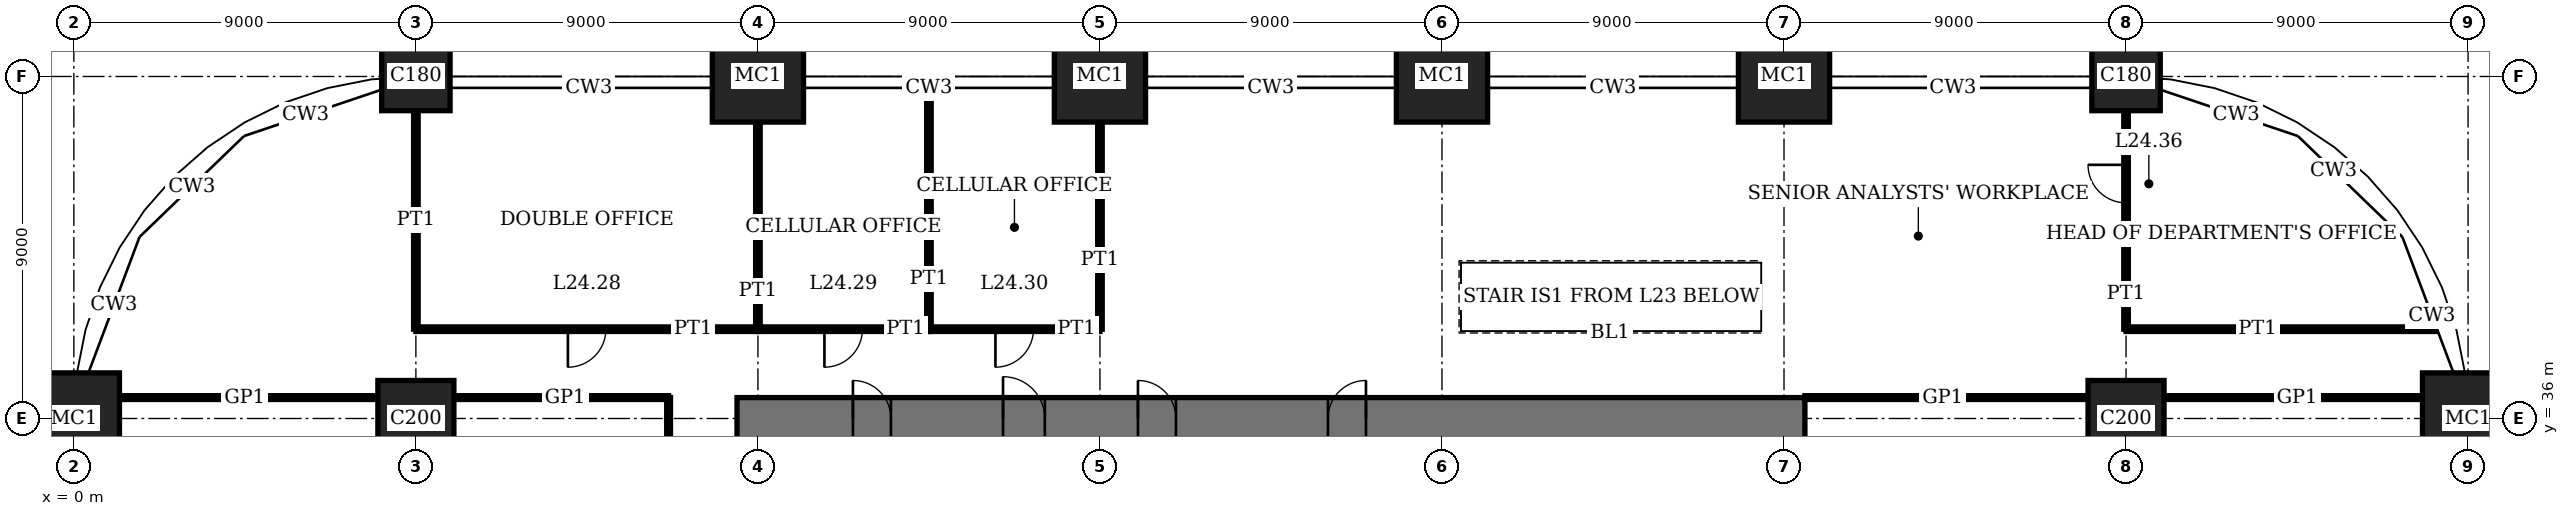
"""IFC4 building model, lengths in metres.
Left out: names, types, materials, properties, quantities, classifications, styles, units other than length and angle.
Written with IfcOpenShell. Run it as: python <this file> out.ifc"""

import sys

from ifc_helpers import new_model, si_unit, direction, frame, frame_2d, origin, origin_2d, place, context, subcontext, project, spatial, rectangle, extrude, element, fill, save


model = new_model("IFC4")
c1 = context("Model", 3, precision=1e-05, world=origin(), true_north=direction((0.0, 1.0)))
c2 = subcontext(c1, "Body", "Model", "MODEL_VIEW")
j1 = project(units=[si_unit("LENGTHUNIT", "METRE"), si_unit("PLANEANGLEUNIT", "RADIAN")], contexts=[c1])
p1 = place(None, origin())
s1 = spatial("IfcSite", under=j1, at=p1, CompositionType="ELEMENT")
p2 = place(p1, origin())
s2 = spatial("IfcBuilding", under=s1, at=p2, CompositionType="ELEMENT")
p3 = place(p2, frame((0.0, 0.0, 101.0)))
s3 = spatial("IfcBuildingStorey", under=s2, at=p3, CompositionType="ELEMENT", Elevation=101.0)
p4 = place(p3, frame((0.0, 36.0, 0.0), z_axis=(0.0, 0.0, 1.0), x_axis=(1.0, 0.0, 0.0)))
e1 = element("IfcColumn", 1, at=p4, inside=s3, PredefinedType="COLUMN", context=c2, shape_type="SweptSolid", body=[
    extrude(rectangle(XDim=2.4, YDim=2.4, at=origin_2d()), origin(), (0.0, 0.0, 1.0), 4.0),
])
p5 = place(p3, frame((9.0, 36.0, 0.0), z_axis=(0.0, 0.0, 1.0), x_axis=(1.0, 0.0, 0.0)))
e2 = element("IfcColumn", 2, at=p5, inside=s3, PredefinedType="COLUMN", context=c2, shape_type="SweptSolid", body=[
    extrude(rectangle(XDim=2.0, YDim=2.0, at=origin_2d()), origin(), (0.0, 0.0, 1.0), 4.0),
])
p6 = place(p3, frame((9.0, 45.0, 0.0), z_axis=(0.0, 0.0, 1.0), x_axis=(1.0, 0.0, 0.0)))
e3 = element("IfcColumn", 3, at=p6, inside=s3, PredefinedType="COLUMN", context=c2, shape_type="SweptSolid", body=[
    extrude(rectangle(XDim=1.8, YDim=1.8, at=origin_2d()), origin(), (0.0, 0.0, 1.0), 4.0),
])
for number, where, z_axis, x_axis in (
    (4, (18.0, 45.0, 0.0), (0.0, 0.0, 1.0), (1.0, 0.0, 0.0)),
    (5, (27.0, 45.0, 0.0), (0.0, 0.0, 1.0), (1.0, 0.0, 0.0)),
    (6, (36.0, 45.0, 0.0), (0.0, 0.0, 1.0), (1.0, 0.0, 0.0)),
    (7, (45.0, 45.0, 0.0), (0.0, 0.0, 1.0), (1.0, 0.0, 0.0)),
):
    element("IfcColumn", number, at=place(p3, frame(where, z_axis=z_axis, x_axis=x_axis)), inside=s3, PredefinedType="COLUMN", context=c2, shape_type="SweptSolid", body=[
        extrude(rectangle(XDim=2.4, YDim=2.4, at=origin_2d()), origin(), (0.0, 0.0, 1.0), 4.0),
    ])
p7 = place(p3, frame((54.0, 36.0, 0.0), z_axis=(0.0, 0.0, 1.0), x_axis=(1.0, 0.0, 0.0)))
e8 = element("IfcColumn", 8, at=p7, inside=s3, PredefinedType="COLUMN", context=c2, shape_type="SweptSolid", body=[
    extrude(rectangle(XDim=2.0, YDim=2.0, at=origin_2d()), origin(), (0.0, 0.0, 1.0), 4.0),
])
p8 = place(p3, frame((54.0, 45.0, 0.0), z_axis=(0.0, 0.0, 1.0), x_axis=(1.0, 0.0, 0.0)))
e9 = element("IfcColumn", 9, at=p8, inside=s3, PredefinedType="COLUMN", context=c2, shape_type="SweptSolid", body=[
    extrude(rectangle(XDim=1.8, YDim=1.8, at=origin_2d()), origin(), (0.0, 0.0, 1.0), 4.0),
])
p9 = place(p3, frame((63.0, 36.0, 0.0), z_axis=(0.0, 0.0, 1.0), x_axis=(1.0, 0.0, 0.0)))
e10 = element("IfcColumn", 10, at=p9, inside=s3, PredefinedType="COLUMN", context=c2, shape_type="SweptSolid", body=[
    extrude(rectangle(XDim=2.4, YDim=2.4, at=origin_2d()), origin(), (0.0, 0.0, 1.0), 4.0),
])
p10 = place(p3, frame((45.55, 36.0, 0.0), z_axis=(0.0, 0.0, 1.0), x_axis=(-1.0, 0.0, 0.0)))
e11 = element("IfcWall", 11, at=p10, inside=s3, PredefinedType="SHEAR", context=c2, shape_type="SweptSolid", body=[
    extrude(rectangle(XDim=28.1, YDim=1.1, at=frame_2d((14.05, 0.0))), origin(), (0.0, 0.0, 1.0), 4.0),
])
p11 = place(p10, frame((11.55, 0.0, 0.0)))
e12 = element("IfcOpeningElement", 12, at=p11, cuts=e11, PredefinedType="OPENING", context=c2, shape_type="SweptSolid", body=[
    extrude(rectangle(XDim=1.0, YDim=2.4, at=frame_2d((0.5, 1.2))), frame((0.0, 0.56, 0.0), z_axis=(0.0, -1.0, 0.0), x_axis=(1.0, 0.0, 0.0)), (0.0, 0.0, 1.0), 1.12),
])
p12 = place(p10, frame((16.55, 0.0, 0.0)))
e13 = element("IfcOpeningElement", 13, at=p12, cuts=e11, PredefinedType="OPENING", context=c2, shape_type="SweptSolid", body=[
    extrude(rectangle(XDim=1.0, YDim=2.4, at=frame_2d((0.5, 1.2))), frame((0.0, 0.56, 0.0), z_axis=(0.0, -1.0, 0.0), x_axis=(1.0, 0.0, 0.0)), (0.0, 0.0, 1.0), 1.12),
])
p13 = place(p10, frame((20.0, 0.0, 0.0)))
e14 = element("IfcOpeningElement", 14, at=p13, cuts=e11, PredefinedType="OPENING", context=c2, shape_type="SweptSolid", body=[
    extrude(rectangle(XDim=1.1, YDim=2.4, at=frame_2d((0.55, 1.2))), frame((0.0, 0.56, 0.0), z_axis=(0.0, -1.0, 0.0), x_axis=(1.0, 0.0, 0.0)), (0.0, 0.0, 1.0), 1.12),
])
p14 = place(p10, frame((24.05, 0.0, 0.0)))
e15 = element("IfcOpeningElement", 15, at=p14, cuts=e11, PredefinedType="OPENING", context=c2, shape_type="SweptSolid", body=[
    extrude(rectangle(XDim=1.0, YDim=2.4, at=frame_2d((0.5, 1.2))), frame((0.0, 0.56, 0.0), z_axis=(0.0, -1.0, 0.0), x_axis=(1.0, 0.0, 0.0)), (0.0, 0.0, 1.0), 1.12),
])
p15 = place(p3, frame((1.2, 36.55, 0.0), z_axis=(0.0, 0.0, 1.0), x_axis=(1.0, 0.0, 0.0)))
e16 = element("IfcWall", 16, at=p15, inside=s3, PredefinedType="PARTITIONING", context=c2, shape_type="SweptSolid", body=[
    extrude(rectangle(XDim=6.8, YDim=0.1, at=frame_2d((3.4, 0.0))), origin(), (0.0, 0.0, 1.0), 3.75),
])
p16 = place(p3, frame((10.0, 36.55, 0.0), z_axis=(0.0, 0.0, 1.0), x_axis=(1.0, 0.0, 0.0)))
e17 = element("IfcWall", 17, at=p16, inside=s3, PredefinedType="PARTITIONING", context=c2, shape_type="SweptSolid", body=[
    extrude(rectangle(XDim=5.65, YDim=0.1, at=frame_2d((2.825, 0.0))), origin(), (0.0, 0.0, 1.0), 3.75),
])
p17 = place(p3, frame((45.55, 36.55, 0.0), z_axis=(0.0, 0.0, 1.0), x_axis=(1.0, 0.0, 0.0)))
e18 = element("IfcWall", 18, at=p17, inside=s3, PredefinedType="PARTITIONING", context=c2, shape_type="SweptSolid", body=[
    extrude(rectangle(XDim=7.45, YDim=0.1, at=frame_2d((3.725, 0.0))), origin(), (0.0, 0.0, 1.0), 3.75),
])
p18 = place(p3, frame((55.0, 36.55, 0.0), z_axis=(0.0, 0.0, 1.0), x_axis=(1.0, 0.0, 0.0)))
e19 = element("IfcWall", 19, at=p18, inside=s3, PredefinedType="PARTITIONING", context=c2, shape_type="SweptSolid", body=[
    extrude(rectangle(XDim=6.8, YDim=0.1, at=frame_2d((3.4, 0.0))), origin(), (0.0, 0.0, 1.0), 3.75),
])
p19 = place(p3, frame((9.0, 38.35, 0.0), z_axis=(0.0, 0.0, 1.0), x_axis=(1.0, 0.0, 0.0)))
e20 = element("IfcWall", 20, at=p19, inside=s3, PredefinedType="PARTITIONING", context=c2, shape_type="SweptSolid", body=[
    extrude(rectangle(XDim=9.0, YDim=0.12, at=frame_2d((4.5, 0.0))), origin(), (0.0, 0.0, 1.0), 3.75),
])
p20 = place(p19, frame((4.0, 0.0, 0.0)))
e21 = element("IfcOpeningElement", 21, at=p20, cuts=e20, PredefinedType="OPENING", context=c2, shape_type="SweptSolid", body=[
    extrude(rectangle(XDim=1.0, YDim=2.4, at=frame_2d((0.5, 1.2))), frame((0.0, 0.07, 0.0), z_axis=(0.0, -1.0, 0.0), x_axis=(1.0, 0.0, 0.0)), (0.0, 0.0, 1.0), 0.14),
])
p21 = place(p3, frame((18.0, 38.35, 0.0), z_axis=(0.0, 0.0, 1.0), x_axis=(1.0, 0.0, 0.0)))
e22 = element("IfcWall", 22, at=p21, inside=s3, PredefinedType="PARTITIONING", context=c2, shape_type="SweptSolid", body=[
    extrude(rectangle(XDim=4.5, YDim=0.12, at=frame_2d((2.25, 0.0))), origin(), (0.0, 0.0, 1.0), 3.75),
])
p22 = place(p21, frame((1.75, 0.0, 0.0)))
e23 = element("IfcOpeningElement", 23, at=p22, cuts=e22, PredefinedType="OPENING", context=c2, shape_type="SweptSolid", body=[
    extrude(rectangle(XDim=1.0, YDim=2.4, at=frame_2d((0.5, 1.2))), frame((0.0, 0.07, 0.0), z_axis=(0.0, -1.0, 0.0), x_axis=(1.0, 0.0, 0.0)), (0.0, 0.0, 1.0), 0.14),
])
p23 = place(p3, frame((22.5, 38.35, 0.0), z_axis=(0.0, 0.0, 1.0), x_axis=(1.0, 0.0, 0.0)))
e24 = element("IfcWall", 24, at=p23, inside=s3, PredefinedType="PARTITIONING", context=c2, shape_type="SweptSolid", body=[
    extrude(rectangle(XDim=4.5, YDim=0.12, at=frame_2d((2.25, 0.0))), origin(), (0.0, 0.0, 1.0), 3.75),
])
p24 = place(p23, frame((1.75, 0.0, 0.0)))
e25 = element("IfcOpeningElement", 25, at=p24, cuts=e24, PredefinedType="OPENING", context=c2, shape_type="SweptSolid", body=[
    extrude(rectangle(XDim=1.0, YDim=2.4, at=frame_2d((0.5, 1.2))), frame((0.0, 0.07, 0.0), z_axis=(0.0, -1.0, 0.0), x_axis=(1.0, 0.0, 0.0)), (0.0, 0.0, 1.0), 0.14),
])
p25 = place(p3, frame((54.0, 38.35, 0.0), z_axis=(0.0, 0.0, 1.0), x_axis=(1.0, 0.0, 0.0)))
e26 = element("IfcWall", 26, at=p25, inside=s3, PredefinedType="PARTITIONING", context=c2, shape_type="SweptSolid", body=[
    extrude(rectangle(XDim=8.145, YDim=0.12, at=frame_2d((4.072, 0.0))), origin(), (0.0, 0.0, 1.0), 3.75),
])
p26 = place(p3, frame((9.0, 38.35, 0.0), z_axis=(0.0, 0.0, 1.0), x_axis=(0.0, 1.0, 0.0)))
e27 = element("IfcWall", 27, at=p26, inside=s3, PredefinedType="PARTITIONING", context=c2, shape_type="SweptSolid", body=[
    extrude(rectangle(XDim=5.75, YDim=0.12, at=frame_2d((2.875, 0.0))), origin(), (0.0, 0.0, 1.0), 3.05),
])
p27 = place(p3, frame((15.65, 27.0, 0.0), z_axis=(0.0, 0.0, 1.0), x_axis=(0.0, 1.0, 0.0)))
e28 = element("IfcWall", 28, at=p27, inside=s3, PredefinedType="PARTITIONING", context=c2, shape_type="SweptSolid", body=[
    extrude(rectangle(XDim=9.55, YDim=0.1, at=frame_2d((4.775, 0.0))), origin(), (0.0, 0.0, 1.0), 3.75),
])
p28 = place(p27, frame((4.275, 0.0, 0.0)))
e29 = element("IfcOpeningElement", 29, at=p28, cuts=e28, PredefinedType="OPENING", context=c2, shape_type="SweptSolid", body=[
    extrude(rectangle(XDim=1.0, YDim=2.4, at=frame_2d((0.5, 1.2))), frame((0.0, 0.06, 0.0), z_axis=(0.0, -1.0, 0.0), x_axis=(1.0, 0.0, 0.0)), (0.0, 0.0, 1.0), 0.12),
])
p29 = place(p3, frame((18.0, 38.35, 0.0), z_axis=(0.0, 0.0, 1.0), x_axis=(0.0, 1.0, 0.0)))
e30 = element("IfcWall", 30, at=p29, inside=s3, PredefinedType="PARTITIONING", context=c2, shape_type="SweptSolid", body=[
    extrude(rectangle(XDim=5.45, YDim=0.12, at=frame_2d((2.725, 0.0))), origin(), (0.0, 0.0, 1.0), 3.05),
])
p30 = place(p3, frame((22.5, 38.35, 0.0), z_axis=(0.0, 0.0, 1.0), x_axis=(0.0, 1.0, 0.0)))
e31 = element("IfcWall", 31, at=p30, inside=s3, PredefinedType="PARTITIONING", context=c2, shape_type="SweptSolid", body=[
    extrude(rectangle(XDim=6.34, YDim=0.12, at=frame_2d((3.17, 0.0))), origin(), (0.0, 0.0, 1.0), 3.75),
])
p31 = place(p3, frame((27.0, 38.35, 0.0), z_axis=(0.0, 0.0, 1.0), x_axis=(0.0, 1.0, 0.0)))
e32 = element("IfcWall", 32, at=p31, inside=s3, PredefinedType="PARTITIONING", context=c2, shape_type="SweptSolid", body=[
    extrude(rectangle(XDim=5.45, YDim=0.12, at=frame_2d((2.725, 0.0))), origin(), (0.0, 0.0, 1.0), 3.05),
])
p32 = place(p3, frame((54.0, 38.35, 0.0), z_axis=(0.0, 0.0, 1.0), x_axis=(0.0, 1.0, 0.0)))
e33 = element("IfcWall", 33, at=p32, inside=s3, PredefinedType="PARTITIONING", context=c2, shape_type="SweptSolid", body=[
    extrude(rectangle(XDim=5.75, YDim=0.12, at=frame_2d((2.875, 0.0))), origin(), (0.0, 0.0, 1.0), 3.05),
])
p33 = place(p32, frame((3.325, 0.0, 0.0)))
e34 = element("IfcOpeningElement", 34, at=p33, cuts=e33, PredefinedType="OPENING", context=c2, shape_type="SweptSolid", body=[
    extrude(rectangle(XDim=1.0, YDim=2.4, at=frame_2d((0.5, 1.2))), frame((0.0, 0.07, 0.0), z_axis=(0.0, -1.0, 0.0), x_axis=(1.0, 0.0, 0.0)), (0.0, 0.0, 1.0), 0.14),
])
p34 = place(p11, origin())
e35 = element("IfcDoor", 35, at=p34, inside=s3, OperationType="SINGLE_SWING_LEFT", PredefinedType="DOOR", context=c2, shape_type="SweptSolid", body=[
    extrude(rectangle(XDim=1.0, YDim=2.4, at=frame_2d((0.5, 1.2))), frame((0.0, 0.025, 0.0), z_axis=(0.0, -1.0, 0.0), x_axis=(1.0, 0.0, 0.0)), (0.0, 0.0, 1.0), 0.05),
    extrude(rectangle(XDim=0.04, YDim=2.4, at=frame_2d((0.02, 1.2))), frame((0.0, 0.4, 0.0), z_axis=(0.0, -1.0, 0.0), x_axis=(1.0, 0.0, 0.0)), (0.0, 0.0, 1.0), 0.8),
    extrude(rectangle(XDim=0.04, YDim=2.4, at=frame_2d((0.98, 1.2))), frame((0.0, 0.4, 0.0), z_axis=(0.0, -1.0, 0.0), x_axis=(1.0, 0.0, 0.0)), (0.0, 0.0, 1.0), 0.8),
    extrude(rectangle(XDim=1.0, YDim=0.04, at=frame_2d((0.5, 2.38))), frame((0.0, 0.4, 0.0), z_axis=(0.0, -1.0, 0.0), x_axis=(1.0, 0.0, 0.0)), (0.0, 0.0, 1.0), 0.8),
])
fill(e12, e35)
p35 = place(p12, origin())
e36 = element("IfcDoor", 36, at=p35, inside=s3, OperationType="SINGLE_SWING_RIGHT", PredefinedType="DOOR", context=c2, shape_type="SweptSolid", body=[
    extrude(rectangle(XDim=1.0, YDim=2.4, at=frame_2d((0.5, 1.2))), frame((0.0, 0.025, 0.0), z_axis=(0.0, -1.0, 0.0), x_axis=(1.0, 0.0, 0.0)), (0.0, 0.0, 1.0), 0.05),
    extrude(rectangle(XDim=0.04, YDim=2.4, at=frame_2d((0.02, 1.2))), frame((0.0, 0.4, 0.0), z_axis=(0.0, -1.0, 0.0), x_axis=(1.0, 0.0, 0.0)), (0.0, 0.0, 1.0), 0.8),
    extrude(rectangle(XDim=0.04, YDim=2.4, at=frame_2d((0.98, 1.2))), frame((0.0, 0.4, 0.0), z_axis=(0.0, -1.0, 0.0), x_axis=(1.0, 0.0, 0.0)), (0.0, 0.0, 1.0), 0.8),
    extrude(rectangle(XDim=1.0, YDim=0.04, at=frame_2d((0.5, 2.38))), frame((0.0, 0.4, 0.0), z_axis=(0.0, -1.0, 0.0), x_axis=(1.0, 0.0, 0.0)), (0.0, 0.0, 1.0), 0.8),
])
fill(e13, e36)
p36 = place(p13, origin())
e37 = element("IfcDoor", 37, at=p36, inside=s3, OperationType="SINGLE_SWING_RIGHT", PredefinedType="DOOR", context=c2, shape_type="SweptSolid", body=[
    extrude(rectangle(XDim=1.1, YDim=2.4, at=frame_2d((0.55, 1.2))), frame((0.0, 0.025, 0.0), z_axis=(0.0, -1.0, 0.0), x_axis=(1.0, 0.0, 0.0)), (0.0, 0.0, 1.0), 0.05),
    extrude(rectangle(XDim=0.04, YDim=2.4, at=frame_2d((0.02, 1.2))), frame((0.0, 0.44, 0.0), z_axis=(0.0, -1.0, 0.0), x_axis=(1.0, 0.0, 0.0)), (0.0, 0.0, 1.0), 0.88),
    extrude(rectangle(XDim=0.04, YDim=2.4, at=frame_2d((1.08, 1.2))), frame((0.0, 0.44, 0.0), z_axis=(0.0, -1.0, 0.0), x_axis=(1.0, 0.0, 0.0)), (0.0, 0.0, 1.0), 0.88),
    extrude(rectangle(XDim=1.1, YDim=0.04, at=frame_2d((0.55, 2.38))), frame((0.0, 0.44, 0.0), z_axis=(0.0, -1.0, 0.0), x_axis=(1.0, 0.0, 0.0)), (0.0, 0.0, 1.0), 0.88),
])
fill(e14, e37)
p37 = place(p14, origin())
e38 = element("IfcDoor", 38, at=p37, inside=s3, OperationType="SINGLE_SWING_RIGHT", PredefinedType="DOOR", context=c2, shape_type="SweptSolid", body=[
    extrude(rectangle(XDim=1.0, YDim=2.4, at=frame_2d((0.5, 1.2))), frame((0.0, 0.025, 0.0), z_axis=(0.0, -1.0, 0.0), x_axis=(1.0, 0.0, 0.0)), (0.0, 0.0, 1.0), 0.05),
    extrude(rectangle(XDim=0.04, YDim=2.4, at=frame_2d((0.02, 1.2))), frame((0.0, 0.4, 0.0), z_axis=(0.0, -1.0, 0.0), x_axis=(1.0, 0.0, 0.0)), (0.0, 0.0, 1.0), 0.8),
    extrude(rectangle(XDim=0.04, YDim=2.4, at=frame_2d((0.98, 1.2))), frame((0.0, 0.4, 0.0), z_axis=(0.0, -1.0, 0.0), x_axis=(1.0, 0.0, 0.0)), (0.0, 0.0, 1.0), 0.8),
    extrude(rectangle(XDim=1.0, YDim=0.04, at=frame_2d((0.5, 2.38))), frame((0.0, 0.4, 0.0), z_axis=(0.0, -1.0, 0.0), x_axis=(1.0, 0.0, 0.0)), (0.0, 0.0, 1.0), 0.8),
])
fill(e15, e38)
p38 = place(p20, origin())
e39 = element("IfcDoor", 39, at=p38, inside=s3, OperationType="SINGLE_SWING_LEFT", PredefinedType="DOOR", context=c2, shape_type="SweptSolid", body=[
    extrude(rectangle(XDim=1.0, YDim=2.4, at=frame_2d((0.5, 1.2))), frame((0.0, 0.025, 0.0), z_axis=(0.0, -1.0, 0.0), x_axis=(1.0, 0.0, 0.0)), (0.0, 0.0, 1.0), 0.05),
])
fill(e21, e39)
p39 = place(p22, origin())
e40 = element("IfcDoor", 40, at=p39, inside=s3, OperationType="SINGLE_SWING_LEFT", PredefinedType="DOOR", context=c2, shape_type="SweptSolid", body=[
    extrude(rectangle(XDim=1.0, YDim=2.4, at=frame_2d((0.5, 1.2))), frame((0.0, 0.025, 0.0), z_axis=(0.0, -1.0, 0.0), x_axis=(1.0, 0.0, 0.0)), (0.0, 0.0, 1.0), 0.05),
])
fill(e23, e40)
p40 = place(p24, origin())
e41 = element("IfcDoor", 41, at=p40, inside=s3, OperationType="SINGLE_SWING_LEFT", PredefinedType="DOOR", context=c2, shape_type="SweptSolid", body=[
    extrude(rectangle(XDim=1.0, YDim=2.4, at=frame_2d((0.5, 1.2))), frame((0.0, 0.025, 0.0), z_axis=(0.0, -1.0, 0.0), x_axis=(1.0, 0.0, 0.0)), (0.0, 0.0, 1.0), 0.05),
])
fill(e25, e41)
p41 = place(p33, origin())
e42 = element("IfcDoor", 42, at=p41, inside=s3, OperationType="SINGLE_SWING_LEFT", PredefinedType="DOOR", context=c2, shape_type="SweptSolid", body=[
    extrude(rectangle(XDim=1.0, YDim=2.4, at=frame_2d((0.5, 1.2))), frame((0.0, 0.025, 0.0), z_axis=(0.0, -1.0, 0.0), x_axis=(1.0, 0.0, 0.0)), (0.0, 0.0, 1.0), 0.05),
])
fill(e34, e42)
save(model, sys.argv[1])
